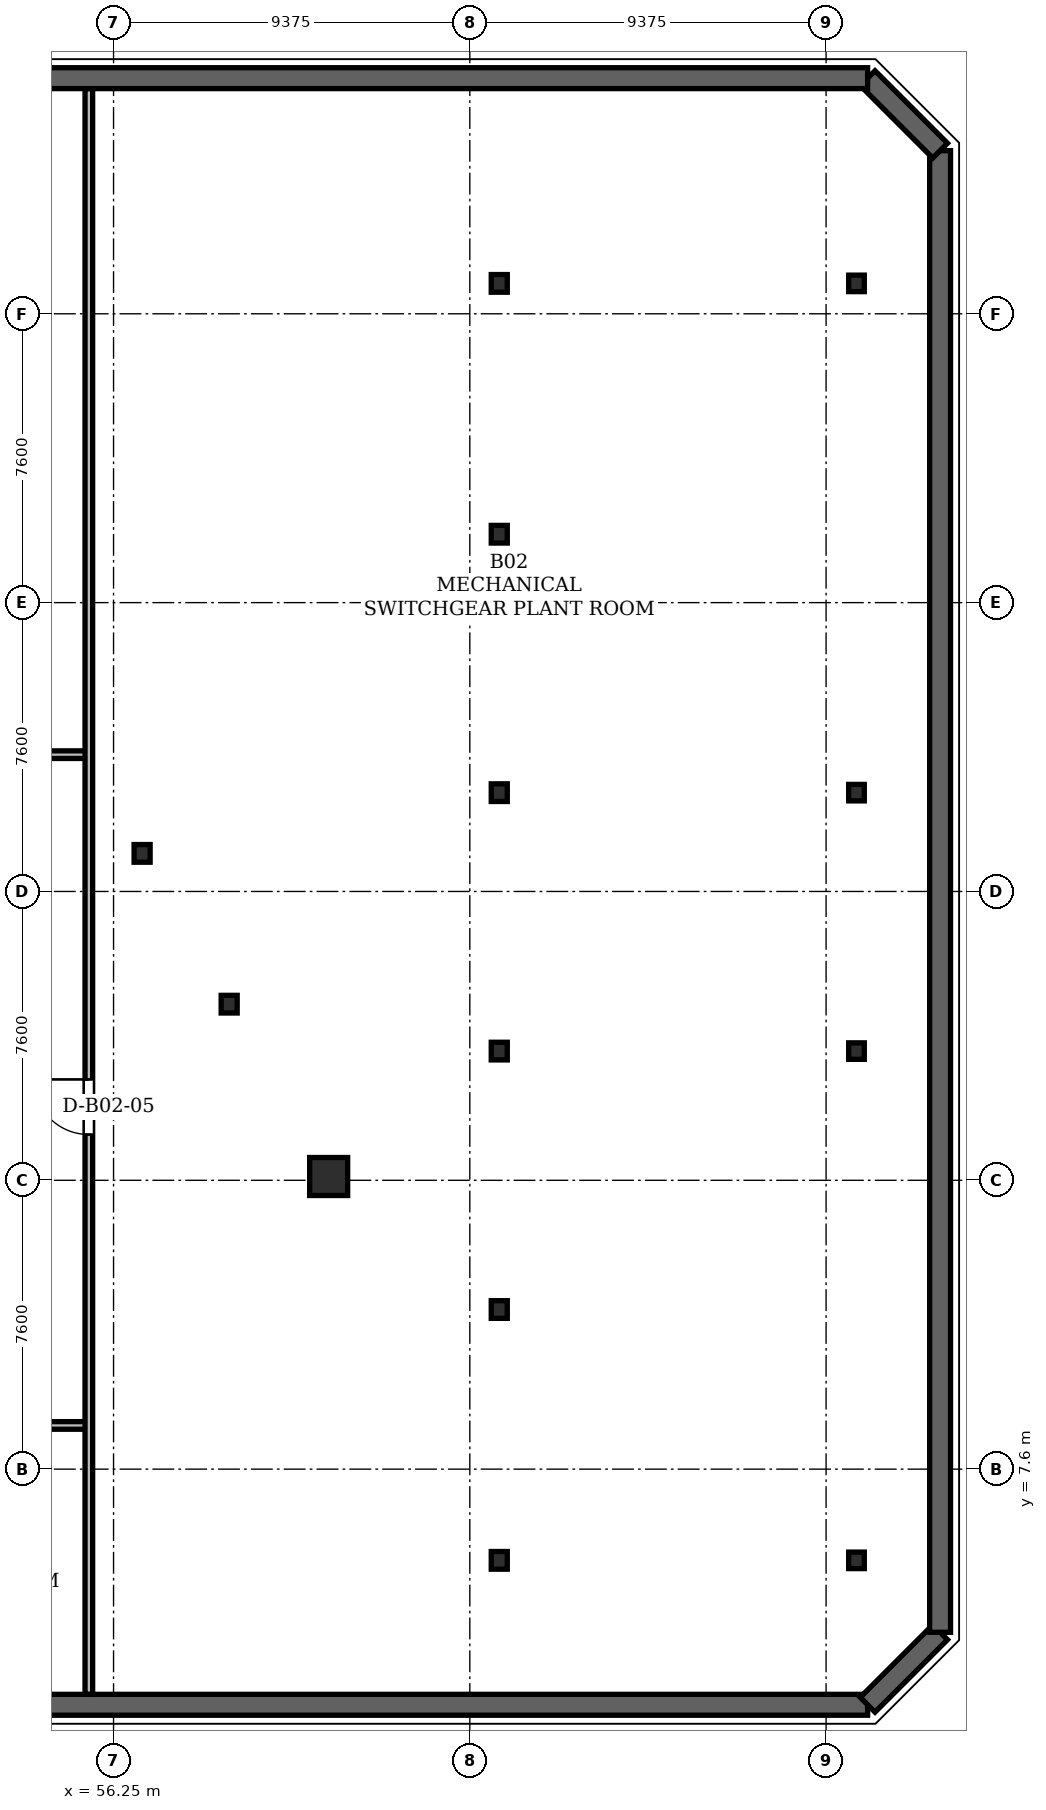
"""IFC4 building model, lengths in metres.
Left out: names, types, materials, properties, quantities, classifications, styles, units other than length and angle.
Written with IfcOpenShell. Run it as: python <this file> out.ifc"""

import sys

from ifc_helpers import new_model, si_unit, direction, frame, frame_2d, origin, origin_2d, place, context, subcontext, project, spatial, rectangle, hollow_rectangle, i_section, extrude, element, fill, save


model = new_model("IFC4")
c1 = context("Model", 3, precision=1e-05, world=origin(), true_north=direction((0.0, 1.0)))
c2 = subcontext(c1, "Body", "Model", "MODEL_VIEW")
j1 = project(units=[si_unit("LENGTHUNIT", "METRE"), si_unit("PLANEANGLEUNIT", "RADIAN")], contexts=[c1])
p1 = place(None, origin())
s1 = spatial("IfcSite", under=j1, at=p1, CompositionType="ELEMENT")
p2 = place(p1, origin())
s2 = spatial("IfcBuilding", under=s1, at=p2, CompositionType="ELEMENT")
p3 = place(p2, frame((0.0, 0.0, -8.0)))
s3 = spatial("IfcBuildingStorey", under=s2, at=p3, CompositionType="ELEMENT", Elevation=-8.0)
p4 = place(p3, frame((61.91, 15.3, 0.0), z_axis=(0.0, 0.0, 1.0), x_axis=(1.0, 0.0, 0.0)))
e1 = element("IfcColumn", 1, at=p4, inside=s3, PredefinedType="COLUMN", context=c2, shape_type="SweptSolid", body=[
    extrude(hollow_rectangle(XDim=1.0, YDim=1.0, WallThickness=0.085, at=origin_2d()), origin(), (0.0, 0.0, 1.0), 3.996),
])
for number, where, z_axis, x_axis in (
    (2, (59.292, 19.834, 0.0), (0.0, 0.0, 1.0), (1.0, 0.0, 0.0)),
    (3, (57.002, 23.802, 0.0), (0.0, 0.0, 1.0), (1.0, 0.0, 0.0)),
):
    element("IfcColumn", number, at=place(p3, frame(where, z_axis=z_axis, x_axis=x_axis)), inside=s3, PredefinedType="COLUMN", context=c2, shape_type="SweptSolid", body=[
        extrude(i_section(OverallWidth=0.422, OverallDepth=0.465, WebThickness=0.045, FlangeThickness=0.072, at=origin_2d()), origin(), (0.0, 0.0, 1.0), 3.996),
    ])
for number, where, z_axis, x_axis in (
    (4, (66.4, 5.2, 0.0), (0.0, 0.0, 1.0), (1.0, 0.0, 0.0)),
    (5, (66.4, 11.8, 0.0), (0.0, 0.0, 1.0), (1.0, 0.0, 0.0)),
    (6, (66.4, 18.6, 0.0), (0.0, 0.0, 1.0), (1.0, 0.0, 0.0)),
    (7, (66.4, 25.4, 0.0), (0.0, 0.0, 1.0), (1.0, 0.0, 0.0)),
    (8, (66.4, 32.2, 0.0), (0.0, 0.0, 1.0), (1.0, 0.0, 0.0)),
    (9, (66.4, 38.8, 0.0), (0.0, 0.0, 1.0), (1.0, 0.0, 0.0)),
):
    element("IfcColumn", number, at=place(p3, frame(where, z_axis=z_axis, x_axis=x_axis)), inside=s3, PredefinedType="COLUMN", context=c2, shape_type="SweptSolid", body=[
        extrude(i_section(OverallWidth=0.422, OverallDepth=0.465, WebThickness=0.045, FlangeThickness=0.072, at=origin_2d()), origin(), (0.0, 0.0, 1.0), 4.0),
    ])
for number, where, z_axis, x_axis in (
    (10, (75.8, 5.2, 0.0), (0.0, 0.0, 1.0), (1.0, 0.0, 0.0)),
    (11, (75.8, 18.6, 0.0), (0.0, 0.0, 1.0), (1.0, 0.0, 0.0)),
    (12, (75.8, 25.4, 0.0), (0.0, 0.0, 1.0), (1.0, 0.0, 0.0)),
    (13, (75.8, 38.8, 0.0), (0.0, 0.0, 1.0), (1.0, 0.0, 0.0)),
):
    element("IfcColumn", number, at=place(p3, frame(where, z_axis=z_axis, x_axis=x_axis)), inside=s3, PredefinedType="COLUMN", context=c2, shape_type="SweptSolid", body=[
        extrude(i_section(OverallWidth=0.411, OverallDepth=0.434, WebThickness=0.036, FlangeThickness=0.057, at=origin_2d()), origin(), (0.0, 0.0, 1.0), 4.0),
    ])
p5 = place(p3, frame((-1.093, 1.4, 0.0), z_axis=(0.0, 0.0, 1.0), x_axis=(1.0, 0.0, 0.0)))
e14 = element("IfcWall", 14, at=p5, inside=s3, PredefinedType="USERDEFINED", context=c2, shape_type="SweptSolid", body=[
    extrude(rectangle(XDim=77.186, YDim=0.55, at=frame_2d((38.593, 0.0))), origin(), (0.0, 0.0, 1.0), 3.72),
])
p6 = place(p3, frame((76.093, 1.4, 0.0), z_axis=(0.0, 0.0, 1.0), x_axis=(0.707061519111, 0.707152040365, 0.0)))
e15 = element("IfcWall", 15, at=p6, inside=s3, PredefinedType="USERDEFINED", context=c2, shape_type="SweptSolid", body=[
    extrude(rectangle(XDim=2.697, YDim=0.55, at=frame_2d((1.349, 0.0))), origin(), (0.0, 0.0, 1.0), 3.72),
])
p7 = place(p3, frame((78.0, 3.307, 0.0), z_axis=(0.0, 0.0, 1.0), x_axis=(0.0, 1.0, 0.0)))
e16 = element("IfcWall", 16, at=p7, inside=s3, PredefinedType="USERDEFINED", context=c2, shape_type="SweptSolid", body=[
    extrude(rectangle(XDim=38.986, YDim=0.55, at=frame_2d((19.493, 0.0))), origin(), (0.0, 0.0, 1.0), 3.72),
])
p8 = place(p3, frame((78.0, 42.293, 0.0), z_axis=(0.0, 0.0, 1.0), x_axis=(-0.707106781187, 0.707106781187, 0.0)))
e17 = element("IfcWall", 17, at=p8, inside=s3, PredefinedType="USERDEFINED", context=c2, shape_type="SweptSolid", body=[
    extrude(rectangle(XDim=2.697, YDim=0.55, at=frame_2d((1.348, 0.0))), origin(), (0.0, 0.0, 1.0), 3.72),
])
p9 = place(p3, frame((76.093, 44.2, 0.0), z_axis=(0.0, 0.0, 1.0), x_axis=(-1.0, 0.0, 0.0)))
e18 = element("IfcWall", 18, at=p9, inside=s3, PredefinedType="USERDEFINED", context=c2, shape_type="SweptSolid", body=[
    extrude(rectangle(XDim=77.186, YDim=0.55, at=frame_2d((38.593, 0.0))), origin(), (0.0, 0.0, 1.0), 3.72),
])
p10 = place(p3, frame((14.03, 8.75, 0.0), z_axis=(0.0, 0.0, 1.0), x_axis=(1.0, 0.0, 0.0)))
e19 = element("IfcWall", 19, at=p10, inside=s3, PredefinedType="PARTITIONING", context=c2, shape_type="SweptSolid", body=[
    extrude(rectangle(XDim=41.57, YDim=0.2, at=frame_2d((20.785, 0.0))), origin(), (0.0, 0.0, 1.0), 2.783),
])
p11 = place(p10, frame((10.511, 0.0, 0.0)))
e20 = element("IfcOpeningElement", 20, at=p11, cuts=e19, PredefinedType="OPENING", context=c2, shape_type="SweptSolid", body=[
    extrude(rectangle(XDim=1.45, YDim=2.25, at=frame_2d((0.725, 1.125))), frame((0.0, 0.1, 0.0), z_axis=(0.0, -1.0, 0.0), x_axis=(1.0, 0.0, 0.0)), (0.0, 0.0, 1.0), 0.2),
])
p12 = place(p10, frame((31.269, 0.0, 0.0)))
e21 = element("IfcOpeningElement", 21, at=p12, cuts=e19, PredefinedType="OPENING", context=c2, shape_type="SweptSolid", body=[
    extrude(rectangle(XDim=1.45, YDim=2.25, at=frame_2d((0.725, 1.125))), frame((0.0, 0.1, 0.0), z_axis=(0.0, -1.0, 0.0), x_axis=(1.0, 0.0, 0.0)), (0.0, 0.0, 1.0), 0.2),
])
p13 = place(p3, frame((27.05, 26.4, 0.0), z_axis=(0.0, 0.0, 1.0), x_axis=(1.0, 0.0, 0.0)))
e22 = element("IfcWall", 22, at=p13, inside=s3, PredefinedType="PARTITIONING", context=c2, shape_type="SweptSolid", body=[
    extrude(rectangle(XDim=28.55, YDim=0.2, at=frame_2d((14.275, 0.0))), origin(), (0.0, 0.0, 1.0), 2.783),
])
p14 = place(p13, frame((13.55, 0.0, 0.0)))
e23 = element("IfcOpeningElement", 23, at=p14, cuts=e22, PredefinedType="OPENING", context=c2, shape_type="SweptSolid", body=[
    extrude(rectangle(XDim=1.45, YDim=2.25, at=frame_2d((0.725, 1.125))), frame((0.0, 0.1, 0.0), z_axis=(0.0, -1.0, 0.0), x_axis=(1.0, 0.0, 0.0)), (0.0, 0.0, 1.0), 0.2),
])
p15 = place(p3, frame((55.6, 1.679, 0.0), z_axis=(0.0, 0.0, 1.0), x_axis=(0.0, 1.0, 0.0)))
e24 = element("IfcWall", 24, at=p15, inside=s3, PredefinedType="PARTITIONING", context=c2, shape_type="SweptSolid", body=[
    extrude(rectangle(XDim=42.242, YDim=0.2, at=frame_2d((21.121, 0.0))), origin(), (0.0, 0.0, 1.0), 2.51),
])
p16 = place(p15, frame((14.725, 0.0, 0.0)))
e25 = element("IfcOpeningElement", 25, at=p16, cuts=e24, PredefinedType="OPENING", context=c2, shape_type="SweptSolid", body=[
    extrude(rectangle(XDim=1.45, YDim=2.25, at=frame_2d((0.725, 1.125))), frame((0.0, 0.1, 0.0), z_axis=(0.0, -1.0, 0.0), x_axis=(1.0, 0.0, 0.0)), (0.0, 0.0, 1.0), 0.2),
])
p17 = place(p16, origin())
e26 = element("IfcDoor", 26, at=p17, inside=s3, OperationType="SINGLE_SWING_RIGHT", PredefinedType="DOOR", context=c2, shape_type="SweptSolid", body=[
    extrude(rectangle(XDim=1.45, YDim=2.25, at=frame_2d((0.725, 1.125))), frame((0.0, 0.025, 0.0), z_axis=(0.0, -1.0, 0.0), x_axis=(1.0, 0.0, 0.0)), (0.0, 0.0, 1.0), 0.05),
])
fill(e25, e26)
save(model, sys.argv[1])
